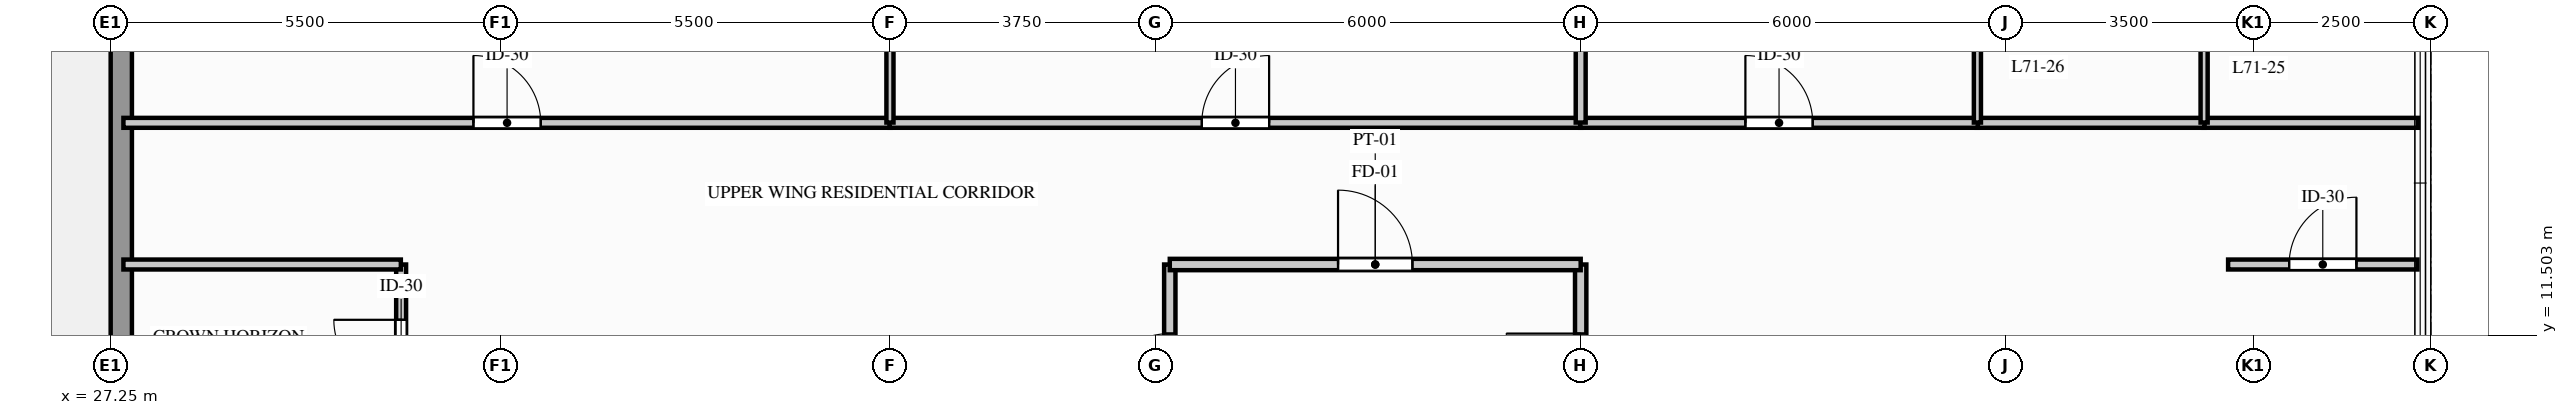
"""IFC4 building model, lengths in metres.
Left out: names, types, materials, properties, quantities, classifications, styles, units other than length and angle.
Written with IfcOpenShell. Run it as: python <this file> out.ifc"""

import sys

from ifc_helpers import new_model, si_unit, direction, frame, frame_2d, origin, place, context, subcontext, project, spatial, rectangle, extrude, element, fill, save


model = new_model("IFC4")
c1 = context("Model", 3, precision=1e-05, world=origin(), true_north=direction((0.0, 1.0)))
c2 = subcontext(c1, "Body", "Model", "MODEL_VIEW")
j1 = project(units=[si_unit("LENGTHUNIT", "METRE"), si_unit("PLANEANGLEUNIT", "RADIAN")], contexts=[c1])
p1 = place(None, origin())
s1 = spatial("IfcSite", under=j1, at=p1, CompositionType="ELEMENT")
p2 = place(p1, origin())
s2 = spatial("IfcBuilding", under=s1, at=p2, CompositionType="ELEMENT")
p3 = place(p2, frame((0.0, 0.0, 233.5)))
s3 = spatial("IfcBuildingStorey", under=s2, at=p3, CompositionType="ELEMENT", Elevation=233.5)
p4 = place(p3, frame((27.4, 24.0, 0.0), z_axis=(0.0, 0.0, 1.0), x_axis=(0.0, -1.0, 0.0)))
e1 = element("IfcWall", 1, at=p4, inside=s3, PredefinedType="STANDARD", context=c2, shape_type="SweptSolid", body=[
    extrude(rectangle(XDim=21.5, YDim=0.3, at=frame_2d((10.75, 0.0))), origin(), (0.0, 0.0, 1.0), 2.332),
])
p5 = place(p4, frame((5.5, 0.0, 0.0)))
e2 = element("IfcOpeningElement", 2, at=p5, cuts=e1, PredefinedType="OPENING", context=c2, shape_type="SweptSolid", body=[
    extrude(rectangle(XDim=1.1, YDim=2.2, at=frame_2d((0.55, 1.1))), frame((0.0, 0.16, 0.0), z_axis=(0.0, -1.0, 0.0), x_axis=(1.0, 0.0, 0.0)), (0.0, 0.0, 1.0), 0.32),
])
p6 = place(p4, frame((1.3, 0.0, 0.312)))
e3 = element("IfcOpeningElement", 3, at=p6, cuts=e1, PredefinedType="OPENING", context=c2, shape_type="SweptSolid", body=[
    extrude(rectangle(XDim=1.5, YDim=1.8, at=frame_2d((0.75, 0.9))), frame((0.0, 0.16, 0.0), z_axis=(0.0, -1.0, 0.0), x_axis=(1.0, 0.0, 0.0)), (0.0, 0.0, 1.0), 0.32),
])
p7 = place(p3, frame((31.35, 9.989, 0.0), z_axis=(0.0, 0.0, 1.0), x_axis=(0.0, 1.0, 0.0)))
e4 = element("IfcWall", 4, at=p7, inside=s3, PredefinedType="PARTITIONING", context=c2, shape_type="SweptSolid", body=[
    extrude(rectangle(XDim=2.511, YDim=0.14, at=frame_2d((1.256, 0.0))), origin(), (0.0, 0.0, 1.0), 2.325),
])
p8 = place(p7, frame((0.781, 0.0, 0.0)))
e5 = element("IfcOpeningElement", 5, at=p8, cuts=e4, PredefinedType="OPENING", context=c2, shape_type="SweptSolid", body=[
    extrude(rectangle(XDim=0.95, YDim=2.05, at=frame_2d((0.475, 1.025))), frame((0.0, 0.08, 0.0), z_axis=(0.0, -1.0, 0.0), x_axis=(1.0, 0.0, 0.0)), (0.0, 0.0, 1.0), 0.16),
])
p9 = place(p3, frame((42.2, 9.5, 0.0), z_axis=(0.0, 0.0, 1.0), x_axis=(0.0, 1.0, 0.0)))
e6 = element("IfcWall", 6, at=p9, inside=s3, PredefinedType="PARTITIONING", context=c2, shape_type="SweptSolid", body=[
    extrude(rectangle(XDim=3.0, YDim=0.16, at=frame_2d((1.5, 0.0))), origin(), (0.0, 0.0, 1.0), 2.325),
])
p10 = place(p9, frame((0.975, 0.0, 0.0)))
e7 = element("IfcOpeningElement", 7, at=p10, cuts=e6, PredefinedType="OPENING", context=c2, shape_type="SweptSolid", body=[
    extrude(rectangle(XDim=1.05, YDim=2.06, at=frame_2d((0.525, 1.03))), frame((0.0, 0.09, 0.0), z_axis=(0.0, -1.0, 0.0), x_axis=(1.0, 0.0, 0.0)), (0.0, 0.0, 1.0), 0.18),
])
p11 = place(p3, frame((48.0, 9.5, 0.0), z_axis=(0.0, 0.0, 1.0), x_axis=(0.0, 1.0, 0.0)))
e8 = element("IfcWall", 8, at=p11, inside=s3, PredefinedType="PARTITIONING", context=c2, shape_type="SweptSolid", body=[
    extrude(rectangle(XDim=3.0, YDim=0.16, at=frame_2d((1.5, 0.0))), origin(), (0.0, 0.0, 1.0), 2.325),
])
p12 = place(p11, frame((0.975, 0.0, 0.0)))
e9 = element("IfcOpeningElement", 9, at=p12, cuts=e8, PredefinedType="OPENING", context=c2, shape_type="SweptSolid", body=[
    extrude(rectangle(XDim=1.05, YDim=2.06, at=frame_2d((0.525, 1.03))), frame((0.0, 0.09, 0.0), z_axis=(0.0, -1.0, 0.0), x_axis=(1.0, 0.0, 0.0)), (0.0, 0.0, 1.0), 0.18),
])
p13 = place(p3, frame((42.2, 12.5, 0.0), z_axis=(0.0, 0.0, 1.0), x_axis=(1.0, 0.0, 0.0)))
e10 = element("IfcWall", 10, at=p13, inside=s3, PredefinedType="PARTITIONING", context=c2, shape_type="SweptSolid", body=[
    extrude(rectangle(XDim=5.8, YDim=0.16, at=frame_2d((2.9, 0.0))), origin(), (0.0, 0.0, 1.0), 2.325),
])
p14 = place(p13, frame((2.375, 0.0, 0.0)))
e11 = element("IfcOpeningElement", 11, at=p14, cuts=e10, PredefinedType="OPENING", context=c2, shape_type="SweptSolid", body=[
    extrude(rectangle(XDim=1.05, YDim=2.06, at=frame_2d((0.525, 1.03))), frame((0.0, 0.09, 0.0), z_axis=(0.0, -1.0, 0.0), x_axis=(1.0, 0.0, 0.0)), (0.0, 0.0, 1.0), 0.18),
])
p15 = place(p3, frame((57.139, 12.5, 0.0), z_axis=(0.0, 0.0, 1.0), x_axis=(1.0, 0.0, 0.0)))
e12 = element("IfcWall", 12, at=p15, inside=s3, PredefinedType="PARTITIONING", context=c2, shape_type="SweptSolid", body=[
    extrude(rectangle(XDim=2.673, YDim=0.14, at=frame_2d((1.336, 0.0))), origin(), (0.0, 0.0, 1.0), 2.89),
])
p16 = place(p15, frame((0.861, 0.0, 0.0)))
e13 = element("IfcOpeningElement", 13, at=p16, cuts=e12, PredefinedType="OPENING", context=c2, shape_type="SweptSolid", body=[
    extrude(rectangle(XDim=0.95, YDim=2.05, at=frame_2d((0.475, 1.025))), frame((0.0, 0.08, 0.0), z_axis=(0.0, -1.0, 0.0), x_axis=(1.0, 0.0, 0.0)), (0.0, 0.0, 1.0), 0.16),
])
p17 = place(p3, frame((27.43, 12.5, 0.0), z_axis=(0.0, 0.0, 1.0), x_axis=(1.0, 0.0, 0.0)))
e14 = element("IfcWall", 14, at=p17, inside=s3, PredefinedType="PARTITIONING", context=c2, shape_type="SweptSolid", body=[
    extrude(rectangle(XDim=3.916, YDim=0.14, at=frame_2d((1.958, 0.0))), origin(), (0.0, 0.0, 1.0), 2.89),
])
p18 = place(p3, frame((27.43, 14.5, 0.0), z_axis=(0.0, 0.0, 1.0), x_axis=(1.0, 0.0, 0.0)))
e15 = element("IfcWall", 15, at=p18, inside=s3, PredefinedType="PARTITIONING", context=c2, shape_type="SweptSolid", body=[
    extrude(rectangle(XDim=10.831, YDim=0.14, at=frame_2d((5.416, 0.0))), origin(), (0.0, 0.0, 1.0), 2.325),
])
p19 = place(p18, frame((4.941, 0.0, 0.0)))
e16 = element("IfcOpeningElement", 16, at=p19, cuts=e15, PredefinedType="OPENING", context=c2, shape_type="SweptSolid", body=[
    extrude(rectangle(XDim=0.95, YDim=2.05, at=frame_2d((0.475, 1.025))), frame((0.0, 0.08, 0.0), z_axis=(0.0, -1.0, 0.0), x_axis=(1.0, 0.0, 0.0)), (0.0, 0.0, 1.0), 0.16),
])
p20 = place(p3, frame((38.243, 14.5, 0.0), z_axis=(0.0, 0.0, 1.0), x_axis=(1.0, 0.0, 0.0)))
e17 = element("IfcWall", 17, at=p20, inside=s3, PredefinedType="PARTITIONING", context=c2, shape_type="SweptSolid", body=[
    extrude(rectangle(XDim=9.769, YDim=0.14, at=frame_2d((4.884, 0.0))), origin(), (0.0, 0.0, 1.0), 2.325),
])
p21 = place(p20, frame((4.409, 0.0, 0.0)))
e18 = element("IfcOpeningElement", 18, at=p21, cuts=e17, PredefinedType="OPENING", context=c2, shape_type="SweptSolid", body=[
    extrude(rectangle(XDim=0.95, YDim=2.05, at=frame_2d((0.475, 1.025))), frame((0.0, 0.08, 0.0), z_axis=(0.0, -1.0, 0.0), x_axis=(1.0, 0.0, 0.0)), (0.0, 0.0, 1.0), 0.16),
])
p22 = place(p3, frame((56.789, 14.5, 0.0), z_axis=(0.0, 0.0, 1.0), x_axis=(1.0, 0.0, 0.0)))
e19 = element("IfcWall", 19, at=p22, inside=s3, PredefinedType="PARTITIONING", context=c2, shape_type="SweptSolid", body=[
    extrude(rectangle(XDim=3.031, YDim=0.14, at=frame_2d((1.516, 0.0))), origin(), (0.0, 0.0, 1.0), 2.89),
])
p23 = place(p3, frame((53.589, 14.5, 0.0), z_axis=(0.0, 0.0, 1.0), x_axis=(1.0, 0.0, 0.0)))
e20 = element("IfcWall", 20, at=p23, inside=s3, PredefinedType="PARTITIONING", context=c2, shape_type="SweptSolid", body=[
    extrude(rectangle(XDim=3.219, YDim=0.14, at=frame_2d((1.609, 0.0))), origin(), (0.0, 0.0, 1.0), 2.325),
])
p24 = place(p3, frame((47.993, 14.5, 0.0), z_axis=(0.0, 0.0, 1.0), x_axis=(1.0, 0.0, 0.0)))
e21 = element("IfcWall", 21, at=p24, inside=s3, PredefinedType="PARTITIONING", context=c2, shape_type="SweptSolid", body=[
    extrude(rectangle(XDim=5.615, YDim=0.14, at=frame_2d((2.807, 0.0))), origin(), (0.0, 0.0, 1.0), 2.325),
])
p25 = place(p24, frame((2.332, 0.0, 0.0)))
e22 = element("IfcOpeningElement", 22, at=p25, cuts=e21, PredefinedType="OPENING", context=c2, shape_type="SweptSolid", body=[
    extrude(rectangle(XDim=0.95, YDim=2.05, at=frame_2d((0.475, 1.025))), frame((0.0, 0.08, 0.0), z_axis=(0.0, -1.0, 0.0), x_axis=(1.0, 0.0, 0.0)), (0.0, 0.0, 1.0), 0.16),
])
p26 = place(p3, frame((38.25, 14.504, 0.0), z_axis=(0.0, 0.0, 1.0), x_axis=(0.0, 1.0, 0.0)))
e23 = element("IfcWall", 23, at=p26, inside=s3, PredefinedType="PARTITIONING", context=c2, shape_type="SweptSolid", body=[
    extrude(rectangle(XDim=11.816, YDim=0.1, at=frame_2d((5.908, 0.0))), origin(), (0.0, 0.0, 1.0), 2.325),
])
p27 = place(p3, frame((48.0, 14.504, 0.0), z_axis=(0.0, 0.0, 1.0), x_axis=(0.0, 1.0, 0.0)))
e24 = element("IfcWall", 24, at=p27, inside=s3, PredefinedType="PARTITIONING", context=c2, shape_type="SweptSolid", body=[
    extrude(rectangle(XDim=7.253, YDim=0.14, at=frame_2d((3.627, 0.0))), origin(), (0.0, 0.0, 1.0), 2.325),
])
for number, where, z_axis, x_axis in (
    (25, (56.8, 14.504, 0.0), (0.0, 0.0, 1.0), (0.0, 1.0, 0.0)),
    (26, (53.6, 14.504, 0.0), (0.0, 0.0, 1.0), (0.0, 1.0, 0.0)),
):
    element("IfcWall", number, at=place(p3, frame(where, z_axis=z_axis, x_axis=x_axis)), inside=s3, PredefinedType="PARTITIONING", context=c2, shape_type="SweptSolid", body=[
        extrude(rectangle(XDim=2.346, YDim=0.1, at=frame_2d((1.173, 0.0))), origin(), (0.0, 0.0, 1.0), 2.325),
    ])
p28 = place(p8, origin())
e27 = element("IfcDoor", 27, at=p28, inside=s3, OperationType="SINGLE_SWING_RIGHT", PredefinedType="DOOR", context=c2, shape_type="SweptSolid", body=[
    extrude(rectangle(XDim=0.95, YDim=2.05, at=frame_2d((0.475, 1.025))), frame((0.0, 0.025, 0.0), z_axis=(0.0, -1.0, 0.0), x_axis=(1.0, 0.0, 0.0)), (0.0, 0.0, 1.0), 0.05),
])
fill(e5, e27)
p29 = place(p10, origin())
e28 = element("IfcDoor", 28, at=p29, inside=s3, OperationType="SINGLE_SWING_LEFT", PredefinedType="DOOR", context=c2, shape_type="SweptSolid", body=[
    extrude(rectangle(XDim=1.05, YDim=2.06, at=frame_2d((0.525, 1.03))), frame((0.0, 0.025, 0.0), z_axis=(0.0, -1.0, 0.0), x_axis=(1.0, 0.0, 0.0)), (0.0, 0.0, 1.0), 0.05),
])
fill(e7, e28)
p30 = place(p12, origin())
e29 = element("IfcDoor", 29, at=p30, inside=s3, OperationType="SINGLE_SWING_RIGHT", PredefinedType="DOOR", context=c2, shape_type="SweptSolid", body=[
    extrude(rectangle(XDim=1.05, YDim=2.06, at=frame_2d((0.525, 1.03))), frame((0.0, 0.025, 0.0), z_axis=(0.0, -1.0, 0.0), x_axis=(1.0, 0.0, 0.0)), (0.0, 0.0, 1.0), 0.05),
])
fill(e9, e29)
p31 = place(p14, origin())
e30 = element("IfcDoor", 30, at=p31, inside=s3, OperationType="SINGLE_SWING_LEFT", PredefinedType="DOOR", context=c2, shape_type="SweptSolid", body=[
    extrude(rectangle(XDim=1.05, YDim=2.06, at=frame_2d((0.525, 1.03))), frame((0.0, 0.025, 0.0), z_axis=(0.0, -1.0, 0.0), x_axis=(1.0, 0.0, 0.0)), (0.0, 0.0, 1.0), 0.05),
])
fill(e11, e30)
p32 = place(p16, origin())
e31 = element("IfcDoor", 31, at=p32, inside=s3, OperationType="SINGLE_SWING_RIGHT", PredefinedType="DOOR", context=c2, shape_type="SweptSolid", body=[
    extrude(rectangle(XDim=0.95, YDim=2.05, at=frame_2d((0.475, 1.025))), frame((0.0, 0.025, 0.0), z_axis=(0.0, -1.0, 0.0), x_axis=(1.0, 0.0, 0.0)), (0.0, 0.0, 1.0), 0.05),
])
fill(e13, e31)
p33 = place(p19, origin())
e32 = element("IfcDoor", 32, at=p33, inside=s3, OperationType="SINGLE_SWING_LEFT", PredefinedType="DOOR", context=c2, shape_type="SweptSolid", body=[
    extrude(rectangle(XDim=0.95, YDim=2.05, at=frame_2d((0.475, 1.025))), frame((0.0, 0.025, 0.0), z_axis=(0.0, -1.0, 0.0), x_axis=(1.0, 0.0, 0.0)), (0.0, 0.0, 1.0), 0.05),
])
fill(e16, e32)
p34 = place(p21, origin())
e33 = element("IfcDoor", 33, at=p34, inside=s3, OperationType="SINGLE_SWING_RIGHT", PredefinedType="DOOR", context=c2, shape_type="SweptSolid", body=[
    extrude(rectangle(XDim=0.95, YDim=2.05, at=frame_2d((0.475, 1.025))), frame((0.0, 0.025, 0.0), z_axis=(0.0, -1.0, 0.0), x_axis=(1.0, 0.0, 0.0)), (0.0, 0.0, 1.0), 0.05),
])
fill(e18, e33)
p35 = place(p25, origin())
e34 = element("IfcDoor", 34, at=p35, inside=s3, OperationType="SINGLE_SWING_LEFT", PredefinedType="DOOR", context=c2, shape_type="SweptSolid", body=[
    extrude(rectangle(XDim=0.95, YDim=2.05, at=frame_2d((0.475, 1.025))), frame((0.0, 0.025, 0.0), z_axis=(0.0, -1.0, 0.0), x_axis=(1.0, 0.0, 0.0)), (0.0, 0.0, 1.0), 0.05),
])
fill(e22, e34)
save(model, sys.argv[1])
